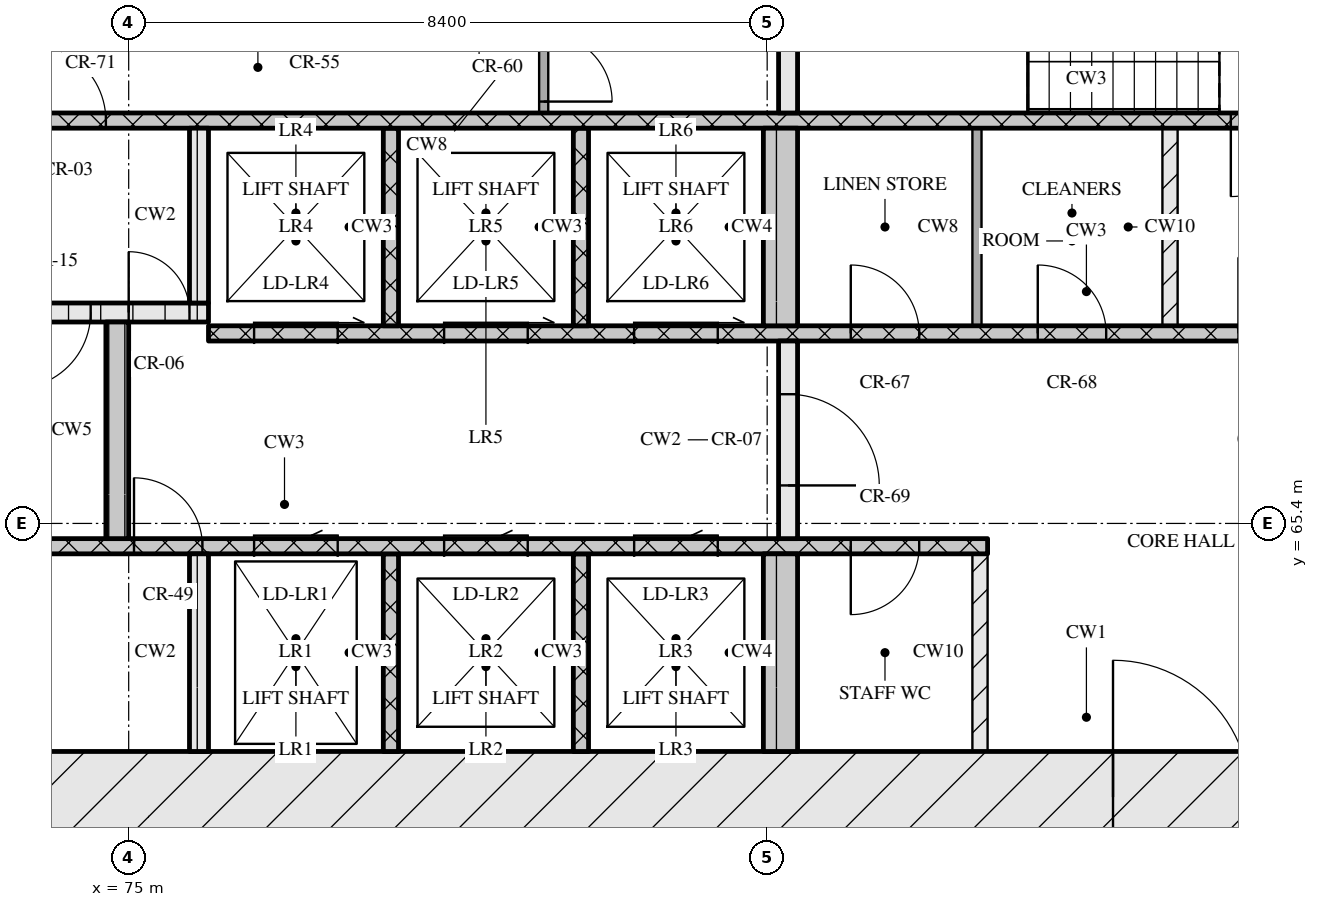
"""IFC4 building model, lengths in metres.
Left out: names, types, materials, properties, quantities, classifications, styles, units other than length and angle.
Written with IfcOpenShell. Run it as: python <this file> out.ifc"""

import sys

from ifc_helpers import new_model, si_unit, direction, frame, frame_2d, origin, place, context, subcontext, project, spatial, rectangle, extrude, element, fill, save


model = new_model("IFC4")
c1 = context("Model", 3, precision=1e-05, world=origin(), true_north=direction((0.0, 1.0)))
c2 = subcontext(c1, "Body", "Model", "MODEL_VIEW")
j1 = project(units=[si_unit("LENGTHUNIT", "METRE"), si_unit("PLANEANGLEUNIT", "RADIAN")], contexts=[c1])
p1 = place(None, origin())
s1 = spatial("IfcSite", under=j1, at=p1, CompositionType="ELEMENT")
p2 = place(p1, origin())
s2 = spatial("IfcBuilding", under=s1, at=p2, CompositionType="ELEMENT")
p3 = place(p2, frame((0.0, 0.0, 58.8)))
s3 = spatial("IfcBuildingStorey", under=s2, at=p3, CompositionType="ELEMENT", Elevation=58.8)
p4 = place(p3, frame((66.6, 61.8, 0.0), z_axis=(0.0, 0.0, 1.0), x_axis=(1.0, 0.0, 0.0)))
e1 = element("IfcWall", 1, at=p4, inside=s3, PredefinedType="SOLIDWALL", context=c2, shape_type="SweptSolid", body=[
    extrude(rectangle(XDim=42.0, YDim=1.2, at=frame_2d((21.0, 0.0))), origin(), (0.0, 0.0, 1.0), 3.32),
])
p5 = place(p4, frame((21.35, 0.0, 0.0)))
e2 = element("IfcOpeningElement", 2, at=p5, cuts=e1, PredefinedType="OPENING", context=c2, shape_type="SweptSolid", body=[
    extrude(rectangle(XDim=1.8, YDim=2.1, at=frame_2d((0.9, 1.05))), frame((0.0, 0.61, 0.0), z_axis=(0.0, -1.0, 0.0), x_axis=(1.0, 0.0, 0.0)), (0.0, 0.0, 1.0), 1.22),
])
p6 = place(p3, frame((75.925, 62.4, 0.0), z_axis=(0.0, 0.0, 1.0), x_axis=(0.0, 1.0, 0.0)))
e3 = element("IfcWall", 3, at=p6, inside=s3, PredefinedType="SOLIDWALL", context=c2, shape_type="SweptSolid", body=[
    extrude(rectangle(XDim=2.6, YDim=0.25, at=frame_2d((1.3, 0.0))), origin(), (0.0, 0.0, 1.0), 3.32),
])
for number, where, z_axis, x_axis in (
    (4, (78.45, 62.4, 0.0), (0.0, 0.0, 1.0), (0.0, 1.0, 0.0)),
    (5, (80.95, 62.4, 0.0), (0.0, 0.0, 1.0), (0.0, 1.0, 0.0)),
):
    element("IfcWall", number, at=place(p3, frame(where, z_axis=z_axis, x_axis=x_axis)), inside=s3, PredefinedType="SOLIDWALL", context=c2, shape_type="SweptSolid", body=[
        extrude(rectangle(XDim=2.6, YDim=0.2, at=frame_2d((1.3, 0.0))), origin(), (0.0, 0.0, 1.0), 3.32),
    ])
p7 = place(p3, frame((83.575, 62.4, 0.0), z_axis=(0.0, 0.0, 1.0), x_axis=(0.0, 1.0, 0.0)))
e6 = element("IfcWall", 6, at=p7, inside=s3, PredefinedType="SOLIDWALL", context=c2, shape_type="SweptSolid", body=[
    extrude(rectangle(XDim=2.6, YDim=0.45, at=frame_2d((1.3, 0.0))), origin(), (0.0, 0.0, 1.0), 3.32),
])
p8 = place(p3, frame((86.2, 62.4, 0.0), z_axis=(0.0, 0.0, 1.0), x_axis=(0.0, 1.0, 0.0)))
e7 = element("IfcWall", 7, at=p8, inside=s3, PredefinedType="PARTITIONING", context=c2, shape_type="SweptSolid", body=[
    extrude(rectangle(XDim=2.6, YDim=0.2, at=frame_2d((1.3, 0.0))), origin(), (0.0, 0.0, 1.0), 3.32),
])
p9 = place(p3, frame((67.8, 65.1, 0.0), z_axis=(0.0, 0.0, 1.0), x_axis=(1.0, 0.0, 0.0)))
e8 = element("IfcWall", 8, at=p9, inside=s3, PredefinedType="SOLIDWALL", context=c2, shape_type="SweptSolid", body=[
    extrude(rectangle(XDim=18.5, YDim=0.2, at=frame_2d((9.25, 0.0))), origin(), (0.0, 0.0, 1.0), 3.32),
])
p10 = place(p9, frame((7.27, 0.0, 0.0)))
e9 = element("IfcOpeningElement", 9, at=p10, cuts=e8, PredefinedType="OPENING", context=c2, shape_type="SweptSolid", body=[
    extrude(rectangle(XDim=0.9, YDim=2.1, at=frame_2d((0.45, 1.05))), frame((0.0, 0.11, 0.0), z_axis=(0.0, -1.0, 0.0), x_axis=(1.0, 0.0, 0.0)), (0.0, 0.0, 1.0), 0.22),
])
p11 = place(p9, frame((8.85, 0.0, 0.0)))
e10 = element("IfcOpeningElement", 10, at=p11, cuts=e8, PredefinedType="OPENING", context=c2, shape_type="SweptSolid", body=[
    extrude(rectangle(XDim=1.1, YDim=2.1, at=frame_2d((0.55, 1.05))), frame((0.0, 0.11, 0.0), z_axis=(0.0, -1.0, 0.0), x_axis=(1.0, 0.0, 0.0)), (0.0, 0.0, 1.0), 0.22),
])
p12 = place(p9, frame((11.35, 0.0, 0.0)))
e11 = element("IfcOpeningElement", 11, at=p12, cuts=e8, PredefinedType="OPENING", context=c2, shape_type="SweptSolid", body=[
    extrude(rectangle(XDim=1.1, YDim=2.1, at=frame_2d((0.55, 1.05))), frame((0.0, 0.11, 0.0), z_axis=(0.0, -1.0, 0.0), x_axis=(1.0, 0.0, 0.0)), (0.0, 0.0, 1.0), 0.22),
])
p13 = place(p9, frame((13.85, 0.0, 0.0)))
e12 = element("IfcOpeningElement", 12, at=p13, cuts=e8, PredefinedType="OPENING", context=c2, shape_type="SweptSolid", body=[
    extrude(rectangle(XDim=1.1, YDim=2.1, at=frame_2d((0.55, 1.05))), frame((0.0, 0.11, 0.0), z_axis=(0.0, -1.0, 0.0), x_axis=(1.0, 0.0, 0.0)), (0.0, 0.0, 1.0), 0.22),
])
p14 = place(p9, frame((16.7, 0.0, 0.0)))
e13 = element("IfcOpeningElement", 13, at=p14, cuts=e8, PredefinedType="OPENING", context=c2, shape_type="SweptSolid", body=[
    extrude(rectangle(XDim=0.9, YDim=2.1, at=frame_2d((0.45, 1.05))), frame((0.0, 0.11, 0.0), z_axis=(0.0, -1.0, 0.0), x_axis=(1.0, 0.0, 0.0)), (0.0, 0.0, 1.0), 0.22),
])
p15 = place(p3, frame((74.85, 65.2, 0.0), z_axis=(0.0, 0.0, 1.0), x_axis=(0.0, 1.0, 0.0)))
e14 = element("IfcWall", 14, at=p15, inside=s3, PredefinedType="SOLIDWALL", context=c2, shape_type="SweptSolid", body=[
    extrude(rectangle(XDim=2.85, YDim=0.3, at=frame_2d((1.425, 0.0))), origin(), (0.0, 0.0, 1.0), 3.32),
])
p16 = place(p3, frame((83.675, 65.2, 0.0), z_axis=(0.0, 0.0, 1.0), x_axis=(0.0, 1.0, 0.0)))
e15 = element("IfcWall", 15, at=p16, inside=s3, PredefinedType="SOLIDWALL", context=c2, shape_type="SweptSolid", body=[
    extrude(rectangle(XDim=2.6, YDim=0.25, at=frame_2d((1.3, 0.0))), origin(), (0.0, 0.0, 1.0), 3.32),
])
p17 = place(p16, frame((0.7, 0.0, 0.0)))
e16 = element("IfcOpeningElement", 16, at=p17, cuts=e15, PredefinedType="OPENING", context=c2, shape_type="SweptSolid", body=[
    extrude(rectangle(XDim=1.2, YDim=2.1, at=frame_2d((0.6, 1.05))), frame((0.0, 0.135, 0.0), z_axis=(0.0, -1.0, 0.0), x_axis=(1.0, 0.0, 0.0)), (0.0, 0.0, 1.0), 0.27),
])
p18 = place(p3, frame((76.05, 67.9, 0.0), z_axis=(0.0, 0.0, 1.0), x_axis=(1.0, 0.0, 0.0)))
e17 = element("IfcWall", 17, at=p18, inside=s3, PredefinedType="SOLIDWALL", context=c2, shape_type="SweptSolid", body=[
    extrude(rectangle(XDim=23.1, YDim=0.2, at=frame_2d((11.55, 0.0))), origin(), (0.0, 0.0, 1.0), 3.32),
])
p19 = place(p18, frame((0.6, 0.0, 0.0)))
e18 = element("IfcOpeningElement", 18, at=p19, cuts=e17, PredefinedType="OPENING", context=c2, shape_type="SweptSolid", body=[
    extrude(rectangle(XDim=1.1, YDim=2.1, at=frame_2d((0.55, 1.05))), frame((0.0, 0.11, 0.0), z_axis=(0.0, -1.0, 0.0), x_axis=(1.0, 0.0, 0.0)), (0.0, 0.0, 1.0), 0.22),
])
p20 = place(p18, frame((3.1, 0.0, 0.0)))
e19 = element("IfcOpeningElement", 19, at=p20, cuts=e17, PredefinedType="OPENING", context=c2, shape_type="SweptSolid", body=[
    extrude(rectangle(XDim=1.1, YDim=2.1, at=frame_2d((0.55, 1.05))), frame((0.0, 0.11, 0.0), z_axis=(0.0, -1.0, 0.0), x_axis=(1.0, 0.0, 0.0)), (0.0, 0.0, 1.0), 0.22),
])
p21 = place(p18, frame((5.6, 0.0, 0.0)))
e20 = element("IfcOpeningElement", 20, at=p21, cuts=e17, PredefinedType="OPENING", context=c2, shape_type="SweptSolid", body=[
    extrude(rectangle(XDim=1.1, YDim=2.1, at=frame_2d((0.55, 1.05))), frame((0.0, 0.11, 0.0), z_axis=(0.0, -1.0, 0.0), x_axis=(1.0, 0.0, 0.0)), (0.0, 0.0, 1.0), 0.22),
])
p22 = place(p18, frame((8.45, 0.0, 0.0)))
e21 = element("IfcOpeningElement", 21, at=p22, cuts=e17, PredefinedType="OPENING", context=c2, shape_type="SweptSolid", body=[
    extrude(rectangle(XDim=0.9, YDim=2.1, at=frame_2d((0.45, 1.05))), frame((0.0, 0.11, 0.0), z_axis=(0.0, -1.0, 0.0), x_axis=(1.0, 0.0, 0.0)), (0.0, 0.0, 1.0), 0.22),
])
p23 = place(p18, frame((10.91, 0.0, 0.0)))
e22 = element("IfcOpeningElement", 22, at=p23, cuts=e17, PredefinedType="OPENING", context=c2, shape_type="SweptSolid", body=[
    extrude(rectangle(XDim=0.9, YDim=2.1, at=frame_2d((0.45, 1.05))), frame((0.0, 0.11, 0.0), z_axis=(0.0, -1.0, 0.0), x_axis=(1.0, 0.0, 0.0)), (0.0, 0.0, 1.0), 0.22),
])
p24 = place(p18, frame((13.55, 0.0, 0.0)))
e23 = element("IfcOpeningElement", 23, at=p24, cuts=e17, PredefinedType="OPENING", context=c2, shape_type="SweptSolid", body=[
    extrude(rectangle(XDim=1.0, YDim=2.1, at=frame_2d((0.5, 1.05))), frame((0.0, 0.11, 0.0), z_axis=(0.0, -1.0, 0.0), x_axis=(1.0, 0.0, 0.0)), (0.0, 0.0, 1.0), 0.22),
])
for number, where, z_axis, x_axis in (
    (24, (78.45, 68.0, 0.0), (0.0, 0.0, 1.0), (0.0, 1.0, 0.0)),
    (25, (80.95, 68.0, 0.0), (0.0, 0.0, 1.0), (0.0, 1.0, 0.0)),
):
    element("IfcWall", number, at=place(p3, frame(where, z_axis=z_axis, x_axis=x_axis)), inside=s3, PredefinedType="SOLIDWALL", context=c2, shape_type="SweptSolid", body=[
        extrude(rectangle(XDim=2.6, YDim=0.2, at=frame_2d((1.3, 0.0))), origin(), (0.0, 0.0, 1.0), 3.32),
    ])
p25 = place(p3, frame((83.575, 68.0, 0.0), z_axis=(0.0, 0.0, 1.0), x_axis=(0.0, 1.0, 0.0)))
e26 = element("IfcWall", 26, at=p25, inside=s3, PredefinedType="SOLIDWALL", context=c2, shape_type="SweptSolid", body=[
    extrude(rectangle(XDim=2.6, YDim=0.45, at=frame_2d((1.3, 0.0))), origin(), (0.0, 0.0, 1.0), 3.32),
])
p26 = place(p3, frame((86.16, 68.0, 0.0), z_axis=(0.0, 0.0, 1.0), x_axis=(0.0, 1.0, 0.0)))
e27 = element("IfcWall", 27, at=p26, inside=s3, PredefinedType="PARTITIONING", context=c2, shape_type="SweptSolid", body=[
    extrude(rectangle(XDim=2.6, YDim=0.12, at=frame_2d((1.3, 0.0))), origin(), (0.0, 0.0, 1.0), 3.32),
])
p27 = place(p3, frame((88.7, 68.0, 0.0), z_axis=(0.0, 0.0, 1.0), x_axis=(0.0, 1.0, 0.0)))
e28 = element("IfcWall", 28, at=p27, inside=s3, PredefinedType="PARTITIONING", context=c2, shape_type="SweptSolid", body=[
    extrude(rectangle(XDim=2.6, YDim=0.2, at=frame_2d((1.3, 0.0))), origin(), (0.0, 0.0, 1.0), 3.32),
])
p28 = place(p3, frame((67.8, 68.175, 0.0), z_axis=(0.0, 0.0, 1.0), x_axis=(1.0, 0.0, 0.0)))
e29 = element("IfcWall", 29, at=p28, inside=s3, PredefinedType="SOLIDWALL", context=c2, shape_type="SweptSolid", body=[
    extrude(rectangle(XDim=8.25, YDim=0.25, at=frame_2d((4.125, 0.0))), origin(), (0.0, 0.0, 1.0), 3.32),
])
p29 = place(p28, frame((5.7, 0.0, 0.0)))
e30 = element("IfcOpeningElement", 30, at=p29, cuts=e29, PredefinedType="OPENING", context=c2, shape_type="SweptSolid", body=[
    extrude(rectangle(XDim=1.0, YDim=2.1, at=frame_2d((0.5, 1.05))), frame((0.0, 0.135, 0.0), z_axis=(0.0, -1.0, 0.0), x_axis=(1.0, 0.0, 0.0)), (0.0, 0.0, 1.0), 0.27),
])
p30 = place(p28, frame((7.2, 0.0, 0.0)))
e31 = element("IfcOpeningElement", 31, at=p30, cuts=e29, PredefinedType="OPENING", context=c2, shape_type="SweptSolid", body=[
    extrude(rectangle(XDim=0.8, YDim=2.1, at=frame_2d((0.4, 1.05))), frame((0.0, 0.135, 0.0), z_axis=(0.0, -1.0, 0.0), x_axis=(1.0, 0.0, 0.0)), (0.0, 0.0, 1.0), 0.27),
])
p31 = place(p3, frame((75.925, 68.3, 0.0), z_axis=(0.0, 0.0, 1.0), x_axis=(0.0, 1.0, 0.0)))
e32 = element("IfcWall", 32, at=p31, inside=s3, PredefinedType="SOLIDWALL", context=c2, shape_type="SweptSolid", body=[
    extrude(rectangle(XDim=2.3, YDim=0.25, at=frame_2d((1.15, 0.0))), origin(), (0.0, 0.0, 1.0), 3.32),
])
p32 = place(p3, frame((67.8, 70.7, 0.0), z_axis=(0.0, 0.0, 1.0), x_axis=(1.0, 0.0, 0.0)))
e33 = element("IfcWall", 33, at=p32, inside=s3, PredefinedType="SOLIDWALL", context=c2, shape_type="SweptSolid", body=[
    extrude(rectangle(XDim=39.6, YDim=0.2, at=frame_2d((19.8, 0.0))), origin(), (0.0, 0.0, 1.0), 3.32),
])
p33 = place(p32, frame((0.65, 0.0, 0.0)))
e34 = element("IfcOpeningElement", 34, at=p33, cuts=e33, PredefinedType="OPENING", context=c2, shape_type="SweptSolid", body=[
    extrude(rectangle(XDim=1.1, YDim=2.1, at=frame_2d((0.55, 1.05))), frame((0.0, 0.11, 0.0), z_axis=(0.0, -1.0, 0.0), x_axis=(1.0, 0.0, 0.0)), (0.0, 0.0, 1.0), 0.22),
])
p34 = place(p32, frame((3.25, 0.0, 0.0)))
e35 = element("IfcOpeningElement", 35, at=p34, cuts=e33, PredefinedType="OPENING", context=c2, shape_type="SweptSolid", body=[
    extrude(rectangle(XDim=1.1, YDim=2.1, at=frame_2d((0.55, 1.05))), frame((0.0, 0.11, 0.0), z_axis=(0.0, -1.0, 0.0), x_axis=(1.0, 0.0, 0.0)), (0.0, 0.0, 1.0), 0.22),
])
p35 = place(p32, frame((5.9, 0.0, 0.0)))
e36 = element("IfcOpeningElement", 36, at=p35, cuts=e33, PredefinedType="OPENING", context=c2, shape_type="SweptSolid", body=[
    extrude(rectangle(XDim=1.0, YDim=2.1, at=frame_2d((0.5, 1.05))), frame((0.0, 0.11, 0.0), z_axis=(0.0, -1.0, 0.0), x_axis=(1.0, 0.0, 0.0)), (0.0, 0.0, 1.0), 0.22),
])
p36 = place(p32, frame((21.7, 0.0, 0.0)))
e37 = element("IfcOpeningElement", 37, at=p36, cuts=e33, PredefinedType="OPENING", context=c2, shape_type="SweptSolid", body=[
    extrude(rectangle(XDim=1.0, YDim=2.1, at=frame_2d((0.5, 1.05))), frame((0.0, 0.11, 0.0), z_axis=(0.0, -1.0, 0.0), x_axis=(1.0, 0.0, 0.0)), (0.0, 0.0, 1.0), 0.22),
])
p37 = place(p32, frame((32.7, 0.0, 0.0)))
e38 = element("IfcOpeningElement", 38, at=p37, cuts=e33, PredefinedType="OPENING", context=c2, shape_type="SweptSolid", body=[
    extrude(rectangle(XDim=1.0, YDim=2.1, at=frame_2d((0.5, 1.05))), frame((0.0, 0.11, 0.0), z_axis=(0.0, -1.0, 0.0), x_axis=(1.0, 0.0, 0.0)), (0.0, 0.0, 1.0), 0.22),
])
p38 = place(p32, frame((35.25, 0.0, 0.0)))
e39 = element("IfcOpeningElement", 39, at=p38, cuts=e33, PredefinedType="OPENING", context=c2, shape_type="SweptSolid", body=[
    extrude(rectangle(XDim=1.1, YDim=2.1, at=frame_2d((0.55, 1.05))), frame((0.0, 0.11, 0.0), z_axis=(0.0, -1.0, 0.0), x_axis=(1.0, 0.0, 0.0)), (0.0, 0.0, 1.0), 0.22),
])
p39 = place(p32, frame((37.85, 0.0, 0.0)))
e40 = element("IfcOpeningElement", 40, at=p39, cuts=e33, PredefinedType="OPENING", context=c2, shape_type="SweptSolid", body=[
    extrude(rectangle(XDim=1.1, YDim=2.1, at=frame_2d((0.55, 1.05))), frame((0.0, 0.11, 0.0), z_axis=(0.0, -1.0, 0.0), x_axis=(1.0, 0.0, 0.0)), (0.0, 0.0, 1.0), 0.22),
])
p40 = place(p3, frame((80.46, 70.8, 0.0), z_axis=(0.0, 0.0, 1.0), x_axis=(0.0, 1.0, 0.0)))
e41 = element("IfcWall", 41, at=p40, inside=s3, PredefinedType="PARTITIONING", context=c2, shape_type="SweptSolid", body=[
    extrude(rectangle(XDim=1.2, YDim=0.12, at=frame_2d((0.6, 0.0))), origin(), (0.0, 0.0, 1.0), 3.32),
])
p41 = place(p40, frame((0.15, 0.0, 0.0)))
e42 = element("IfcOpeningElement", 42, at=p41, cuts=e41, PredefinedType="OPENING", context=c2, shape_type="SweptSolid", body=[
    extrude(rectangle(XDim=0.9, YDim=2.1, at=frame_2d((0.45, 1.05))), frame((0.0, 0.07, 0.0), z_axis=(0.0, -1.0, 0.0), x_axis=(1.0, 0.0, 0.0)), (0.0, 0.0, 1.0), 0.14),
])
p42 = place(p3, frame((83.675, 70.8, 0.0), z_axis=(0.0, 0.0, 1.0), x_axis=(0.0, 1.0, 0.0)))
e43 = element("IfcWall", 43, at=p42, inside=s3, PredefinedType="SOLIDWALL", context=c2, shape_type="SweptSolid", body=[
    extrude(rectangle(XDim=2.95, YDim=0.25, at=frame_2d((1.475, 0.0))), origin(), (0.0, 0.0, 1.0), 3.32),
])
p43 = place(p5, origin())
e44 = element("IfcDoor", 44, at=p43, inside=s3, OperationType="DOUBLE_DOOR_SINGLE_SWING", PredefinedType="DOOR", context=c2, shape_type="SweptSolid", body=[
    extrude(rectangle(XDim=1.8, YDim=2.1, at=frame_2d((0.9, 1.05))), frame((0.0, 0.025, 0.0), z_axis=(0.0, -1.0, 0.0), x_axis=(1.0, 0.0, 0.0)), (0.0, 0.0, 1.0), 0.05),
])
fill(e2, e44)
p44 = place(p10, origin())
e45 = element("IfcDoor", 45, at=p44, inside=s3, OperationType="SINGLE_SWING_LEFT", PredefinedType="DOOR", context=c2, shape_type="SweptSolid", body=[
    extrude(rectangle(XDim=0.9, YDim=2.1, at=frame_2d((0.45, 1.05))), frame((0.0, 0.025, 0.0), z_axis=(0.0, -1.0, 0.0), x_axis=(1.0, 0.0, 0.0)), (0.0, 0.0, 1.0), 0.05),
])
fill(e9, e45)
p45 = place(p11, origin())
e46 = element("IfcDoor", 46, at=p45, inside=s3, OperationType="SLIDING_TO_LEFT", PredefinedType="DOOR", context=c2, shape_type="SweptSolid", body=[
    extrude(rectangle(XDim=1.1, YDim=2.1, at=frame_2d((0.55, 1.05))), frame((0.0, 0.025, 0.0), z_axis=(0.0, -1.0, 0.0), x_axis=(1.0, 0.0, 0.0)), (0.0, 0.0, 1.0), 0.05),
])
fill(e10, e46)
p46 = place(p12, origin())
e47 = element("IfcDoor", 47, at=p46, inside=s3, OperationType="SLIDING_TO_LEFT", PredefinedType="DOOR", context=c2, shape_type="SweptSolid", body=[
    extrude(rectangle(XDim=1.1, YDim=2.1, at=frame_2d((0.55, 1.05))), frame((0.0, 0.025, 0.0), z_axis=(0.0, -1.0, 0.0), x_axis=(1.0, 0.0, 0.0)), (0.0, 0.0, 1.0), 0.05),
])
fill(e11, e47)
p47 = place(p13, origin())
e48 = element("IfcDoor", 48, at=p47, inside=s3, OperationType="SLIDING_TO_LEFT", PredefinedType="DOOR", context=c2, shape_type="SweptSolid", body=[
    extrude(rectangle(XDim=1.1, YDim=2.1, at=frame_2d((0.55, 1.05))), frame((0.0, 0.025, 0.0), z_axis=(0.0, -1.0, 0.0), x_axis=(1.0, 0.0, 0.0)), (0.0, 0.0, 1.0), 0.05),
])
fill(e12, e48)
p48 = place(p14, origin())
e49 = element("IfcDoor", 49, at=p48, inside=s3, OperationType="SINGLE_SWING_RIGHT", PredefinedType="DOOR", context=c2, shape_type="SweptSolid", body=[
    extrude(rectangle(XDim=0.9, YDim=2.1, at=frame_2d((0.45, 1.05))), frame((0.0, 0.025, 0.0), z_axis=(0.0, -1.0, 0.0), x_axis=(1.0, 0.0, 0.0)), (0.0, 0.0, 1.0), 0.05),
])
fill(e13, e49)
p49 = place(p17, origin())
e50 = element("IfcDoor", 50, at=p49, inside=s3, OperationType="SINGLE_SWING_RIGHT", PredefinedType="DOOR", context=c2, shape_type="SweptSolid", body=[
    extrude(rectangle(XDim=1.2, YDim=2.1, at=frame_2d((0.6, 1.05))), frame((0.0, 0.025, 0.0), z_axis=(0.0, -1.0, 0.0), x_axis=(1.0, 0.0, 0.0)), (0.0, 0.0, 1.0), 0.05),
])
fill(e16, e50)
p50 = place(p19, origin())
e51 = element("IfcDoor", 51, at=p50, inside=s3, OperationType="SLIDING_TO_RIGHT", PredefinedType="DOOR", context=c2, shape_type="SweptSolid", body=[
    extrude(rectangle(XDim=1.1, YDim=2.1, at=frame_2d((0.55, 1.05))), frame((0.0, 0.025, 0.0), z_axis=(0.0, -1.0, 0.0), x_axis=(1.0, 0.0, 0.0)), (0.0, 0.0, 1.0), 0.05),
])
fill(e18, e51)
p51 = place(p20, origin())
e52 = element("IfcDoor", 52, at=p51, inside=s3, OperationType="SLIDING_TO_RIGHT", PredefinedType="DOOR", context=c2, shape_type="SweptSolid", body=[
    extrude(rectangle(XDim=1.1, YDim=2.1, at=frame_2d((0.55, 1.05))), frame((0.0, 0.025, 0.0), z_axis=(0.0, -1.0, 0.0), x_axis=(1.0, 0.0, 0.0)), (0.0, 0.0, 1.0), 0.05),
])
fill(e19, e52)
p52 = place(p21, origin())
e53 = element("IfcDoor", 53, at=p52, inside=s3, OperationType="SLIDING_TO_RIGHT", PredefinedType="DOOR", context=c2, shape_type="SweptSolid", body=[
    extrude(rectangle(XDim=1.1, YDim=2.1, at=frame_2d((0.55, 1.05))), frame((0.0, 0.025, 0.0), z_axis=(0.0, -1.0, 0.0), x_axis=(1.0, 0.0, 0.0)), (0.0, 0.0, 1.0), 0.05),
])
fill(e20, e53)
p53 = place(p22, origin())
e54 = element("IfcDoor", 54, at=p53, inside=s3, OperationType="SINGLE_SWING_LEFT", PredefinedType="DOOR", context=c2, shape_type="SweptSolid", body=[
    extrude(rectangle(XDim=0.9, YDim=2.1, at=frame_2d((0.45, 1.05))), frame((0.0, 0.025, 0.0), z_axis=(0.0, -1.0, 0.0), x_axis=(1.0, 0.0, 0.0)), (0.0, 0.0, 1.0), 0.05),
])
fill(e21, e54)
p54 = place(p23, origin())
e55 = element("IfcDoor", 55, at=p54, inside=s3, OperationType="SINGLE_SWING_LEFT", PredefinedType="DOOR", context=c2, shape_type="SweptSolid", body=[
    extrude(rectangle(XDim=0.9, YDim=2.1, at=frame_2d((0.45, 1.05))), frame((0.0, 0.025, 0.0), z_axis=(0.0, -1.0, 0.0), x_axis=(1.0, 0.0, 0.0)), (0.0, 0.0, 1.0), 0.05),
])
fill(e22, e55)
p55 = place(p29, origin())
e56 = element("IfcDoor", 56, at=p55, inside=s3, OperationType="SINGLE_SWING_RIGHT", PredefinedType="DOOR", context=c2, shape_type="SweptSolid", body=[
    extrude(rectangle(XDim=1.0, YDim=2.1, at=frame_2d((0.5, 1.05))), frame((0.0, 0.025, 0.0), z_axis=(0.0, -1.0, 0.0), x_axis=(1.0, 0.0, 0.0)), (0.0, 0.0, 1.0), 0.05),
])
fill(e30, e56)
p56 = place(p30, origin())
e57 = element("IfcDoor", 57, at=p56, inside=s3, OperationType="SINGLE_SWING_LEFT", PredefinedType="DOOR", context=c2, shape_type="SweptSolid", body=[
    extrude(rectangle(XDim=0.8, YDim=2.1, at=frame_2d((0.4, 1.05))), frame((0.0, 0.025, 0.0), z_axis=(0.0, -1.0, 0.0), x_axis=(1.0, 0.0, 0.0)), (0.0, 0.0, 1.0), 0.05),
])
fill(e31, e57)
p57 = place(p35, origin())
e58 = element("IfcDoor", 58, at=p57, inside=s3, OperationType="SINGLE_SWING_LEFT", PredefinedType="DOOR", context=c2, shape_type="SweptSolid", body=[
    extrude(rectangle(XDim=1.0, YDim=2.1, at=frame_2d((0.5, 1.05))), frame((0.0, 0.025, 0.0), z_axis=(0.0, -1.0, 0.0), x_axis=(1.0, 0.0, 0.0)), (0.0, 0.0, 1.0), 0.05),
])
fill(e36, e58)
p58 = place(p36, origin())
e59 = element("IfcDoor", 59, at=p58, inside=s3, OperationType="SINGLE_SWING_RIGHT", PredefinedType="DOOR", context=c2, shape_type="SweptSolid", body=[
    extrude(rectangle(XDim=1.0, YDim=2.1, at=frame_2d((0.5, 1.05))), frame((0.0, 0.025, 0.0), z_axis=(0.0, -1.0, 0.0), x_axis=(1.0, 0.0, 0.0)), (0.0, 0.0, 1.0), 0.05),
])
fill(e37, e59)
p59 = place(p41, origin())
e60 = element("IfcDoor", 60, at=p59, inside=s3, OperationType="SINGLE_SWING_RIGHT", PredefinedType="DOOR", context=c2, shape_type="SweptSolid", body=[
    extrude(rectangle(XDim=0.9, YDim=2.1, at=frame_2d((0.45, 1.05))), frame((0.0, 0.025, 0.0), z_axis=(0.0, -1.0, 0.0), x_axis=(1.0, 0.0, 0.0)), (0.0, 0.0, 1.0), 0.05),
])
fill(e42, e60)
save(model, sys.argv[1])
